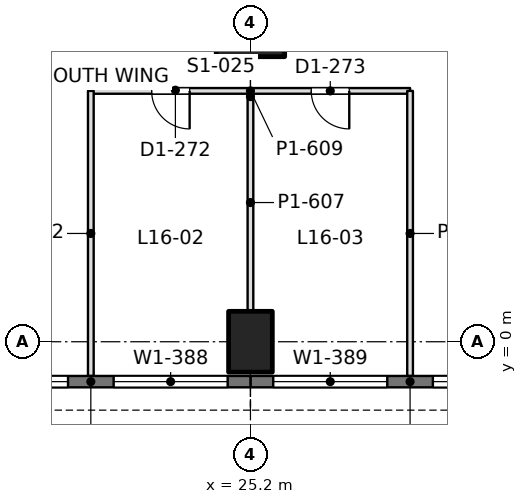
"""IFC4 building model, lengths in metres.
Left out: names, types, materials, properties, quantities, classifications, styles, units other than length and angle.
Written with IfcOpenShell. Run it as: python <this file> out.ifc"""

import sys

from ifc_helpers import new_model, si_unit, direction, frame, frame_2d, origin, origin_2d, place, context, subcontext, project, spatial, rectangle, extrude, element, fill, save


model = new_model("IFC4")
c1 = context("Model", 3, precision=1e-05, world=origin(), true_north=direction((0.0, 1.0)))
c2 = subcontext(c1, "Body", "Model", "MODEL_VIEW")
j1 = project(units=[si_unit("LENGTHUNIT", "METRE"), si_unit("PLANEANGLEUNIT", "RADIAN")], contexts=[c1])
p1 = place(None, origin())
s1 = spatial("IfcSite", under=j1, at=p1, CompositionType="ELEMENT")
p2 = place(p1, origin())
s2 = spatial("IfcBuilding", under=s1, at=p2, CompositionType="ELEMENT")
p3 = place(p2, frame((0.0, 0.0, 72.9)))
s3 = spatial("IfcBuildingStorey", under=s2, at=p3, CompositionType="ELEMENT", Elevation=72.9)
p4 = place(p3, frame((25.2, 0.0, 0.0), z_axis=(0.0, 0.0, 1.0), x_axis=(1.0, 0.0, 0.0)))
e1 = element("IfcColumn", 1, at=p4, inside=s3, PredefinedType="COLUMN", context=c2, shape_type="SweptSolid", body=[
    extrude(rectangle(XDim=1.15, YDim=1.6, at=origin_2d()), origin(), (0.0, 0.0, 1.0), 4.5),
])
p5 = place(p3, frame((25.2, 8.4, 0.0), z_axis=(0.0, 0.0, 1.0), x_axis=(1.0, 0.0, 0.0)))
e2 = element("IfcColumn", 2, at=p5, inside=s3, PredefinedType="COLUMN", context=c2, shape_type="SweptSolid", body=[
    extrude(rectangle(XDim=1.8, YDim=1.8, at=origin_2d()), origin(), (0.0, 0.0, 1.0), 4.5),
])
p6 = place(p3, frame((33.6, -1.05, 0.0), z_axis=(0.0, 0.0, 1.0), x_axis=(-1.0, 0.0, 0.0)))
e3 = element("IfcWall", 3, at=p6, inside=s3, PredefinedType="SOLIDWALL", context=c2, shape_type="SweptSolid", body=[
    extrude(rectangle(XDim=8.4, YDim=0.3, at=frame_2d((4.2, 0.0))), origin(), (0.0, 0.0, 1.0), 4.34),
])
p7 = place(p6, frame((0.6, 0.0, 0.9)))
e4 = element("IfcOpeningElement", 4, at=p7, cuts=e3, PredefinedType="OPENING", context=c2, shape_type="SweptSolid", body=[
    extrude(rectangle(XDim=3.0, YDim=1.9, at=frame_2d((1.5, 0.95))), frame((0.0, 0.16, 0.0), z_axis=(0.0, -1.0, 0.0), x_axis=(1.0, 0.0, 0.0)), (0.0, 0.0, 1.0), 0.32),
])
p8 = place(p6, frame((4.8, 0.0, 0.9)))
e5 = element("IfcOpeningElement", 5, at=p8, cuts=e3, PredefinedType="OPENING", context=c2, shape_type="SweptSolid", body=[
    extrude(rectangle(XDim=3.0, YDim=1.9, at=frame_2d((1.5, 0.95))), frame((0.0, 0.16, 0.0), z_axis=(0.0, -1.0, 0.0), x_axis=(1.0, 0.0, 0.0)), (0.0, 0.0, 1.0), 0.32),
])
p9 = place(p3, frame((25.2, -1.05, 0.0), z_axis=(0.0, 0.0, 1.0), x_axis=(-1.0, 0.0, 0.0)))
e6 = element("IfcWall", 6, at=p9, inside=s3, PredefinedType="SOLIDWALL", context=c2, shape_type="SweptSolid", body=[
    extrude(rectangle(XDim=8.4, YDim=0.3, at=frame_2d((4.2, 0.0))), origin(), (0.0, 0.0, 1.0), 4.34),
])
p10 = place(p9, frame((0.6, 0.0, 0.9)))
e7 = element("IfcOpeningElement", 7, at=p10, cuts=e6, PredefinedType="OPENING", context=c2, shape_type="SweptSolid", body=[
    extrude(rectangle(XDim=3.0, YDim=1.9, at=frame_2d((1.5, 0.95))), frame((0.0, 0.16, 0.0), z_axis=(0.0, -1.0, 0.0), x_axis=(1.0, 0.0, 0.0)), (0.0, 0.0, 1.0), 0.32),
])
p11 = place(p9, frame((4.8, 0.0, 0.9)))
e8 = element("IfcOpeningElement", 8, at=p11, cuts=e6, PredefinedType="OPENING", context=c2, shape_type="SweptSolid", body=[
    extrude(rectangle(XDim=3.0, YDim=1.9, at=frame_2d((1.5, 0.95))), frame((0.0, 0.16, 0.0), z_axis=(0.0, -1.0, 0.0), x_axis=(1.0, 0.0, 0.0)), (0.0, 0.0, 1.0), 0.32),
])
p12 = place(p3, frame((21.0, 6.6, 0.0), z_axis=(0.0, 0.0, 1.0), x_axis=(1.0, 0.0, 0.0)))
e9 = element("IfcWall", 9, at=p12, inside=s3, PredefinedType="PARTITIONING", context=c2, shape_type="SweptSolid", body=[
    extrude(rectangle(XDim=8.4, YDim=0.15, at=frame_2d((4.2, 0.0))), origin(), (0.0, 0.0, 1.0), 3.74),
])
p13 = place(p12, frame((1.6, 0.0, 0.0)))
e10 = element("IfcOpeningElement", 10, at=p13, cuts=e9, PredefinedType="OPENING", context=c2, shape_type="SweptSolid", body=[
    extrude(rectangle(XDim=1.0, YDim=2.2, at=frame_2d((0.5, 1.1))), frame((0.0, 0.085, 0.0), z_axis=(0.0, -1.0, 0.0), x_axis=(1.0, 0.0, 0.0)), (0.0, 0.0, 1.0), 0.17),
])
p14 = place(p12, frame((5.8, 0.0, 0.0)))
e11 = element("IfcOpeningElement", 11, at=p14, cuts=e9, PredefinedType="OPENING", context=c2, shape_type="SweptSolid", body=[
    extrude(rectangle(XDim=1.0, YDim=2.2, at=frame_2d((0.5, 1.1))), frame((0.0, 0.085, 0.0), z_axis=(0.0, -1.0, 0.0), x_axis=(1.0, 0.0, 0.0)), (0.0, 0.0, 1.0), 0.17),
])
p15 = place(p3, frame((21.0, -0.902, 0.0), z_axis=(0.0, 0.0, 1.0), x_axis=(0.0, 1.0, 0.0)))
e12 = element("IfcWall", 12, at=p15, inside=s3, PredefinedType="PARTITIONING", context=c2, shape_type="SweptSolid", body=[
    extrude(rectangle(XDim=7.502, YDim=0.15, at=frame_2d((3.751, 0.0))), origin(), (0.0, 0.0, 1.0), 3.84),
])
p16 = place(p3, frame((25.2, 0.799, 0.0), z_axis=(0.0, 0.0, 1.0), x_axis=(0.0, 1.0, 0.0)))
e13 = element("IfcWall", 13, at=p16, inside=s3, PredefinedType="PARTITIONING", context=c2, shape_type="SweptSolid", body=[
    extrude(rectangle(XDim=5.727, YDim=0.15, at=frame_2d((2.863, 0.0))), origin(), (0.0, 0.0, 1.0), 3.74),
])
p17 = place(p3, frame((29.4, -0.902, 0.0), z_axis=(0.0, 0.0, 1.0), x_axis=(0.0, 1.0, 0.0)))
e14 = element("IfcWall", 14, at=p17, inside=s3, PredefinedType="PARTITIONING", context=c2, shape_type="SweptSolid", body=[
    extrude(rectangle(XDim=7.502, YDim=0.15, at=frame_2d((3.751, 0.0))), origin(), (0.0, 0.0, 1.0), 3.84),
])
p18 = place(p7, origin())
e15 = element("IfcWindow", 15, at=p18, inside=s3, PartitioningType="SINGLE_PANEL", PredefinedType="WINDOW", context=c2, shape_type="SweptSolid", body=[
    extrude(rectangle(XDim=3.0, YDim=1.9, at=frame_2d((1.5, 0.95))), frame((0.0, 0.03, 0.0), z_axis=(0.0, -1.0, 0.0), x_axis=(1.0, 0.0, 0.0)), (0.0, 0.0, 1.0), 0.06),
])
fill(e4, e15)
p19 = place(p8, origin())
e16 = element("IfcWindow", 16, at=p19, inside=s3, PartitioningType="SINGLE_PANEL", PredefinedType="WINDOW", context=c2, shape_type="SweptSolid", body=[
    extrude(rectangle(XDim=3.0, YDim=1.9, at=frame_2d((1.5, 0.95))), frame((0.0, 0.03, 0.0), z_axis=(0.0, -1.0, 0.0), x_axis=(1.0, 0.0, 0.0)), (0.0, 0.0, 1.0), 0.06),
])
fill(e5, e16)
p20 = place(p10, origin())
e17 = element("IfcWindow", 17, at=p20, inside=s3, PartitioningType="SINGLE_PANEL", PredefinedType="WINDOW", context=c2, shape_type="SweptSolid", body=[
    extrude(rectangle(XDim=3.0, YDim=1.9, at=frame_2d((1.5, 0.95))), frame((0.0, 0.03, 0.0), z_axis=(0.0, -1.0, 0.0), x_axis=(1.0, 0.0, 0.0)), (0.0, 0.0, 1.0), 0.06),
])
fill(e7, e17)
p21 = place(p11, origin())
e18 = element("IfcWindow", 18, at=p21, inside=s3, PartitioningType="SINGLE_PANEL", PredefinedType="WINDOW", context=c2, shape_type="SweptSolid", body=[
    extrude(rectangle(XDim=3.0, YDim=1.9, at=frame_2d((1.5, 0.95))), frame((0.0, 0.03, 0.0), z_axis=(0.0, -1.0, 0.0), x_axis=(1.0, 0.0, 0.0)), (0.0, 0.0, 1.0), 0.06),
])
fill(e8, e18)
p22 = place(p13, frame((1.0, 0.0, 0.0), z_axis=(0.0, 0.0, 1.0), x_axis=(-1.0, 0.0, 0.0)))
e19 = element("IfcDoor", 19, at=p22, inside=s3, OperationType="SINGLE_SWING_LEFT", PredefinedType="DOOR", context=c2, shape_type="SweptSolid", body=[
    extrude(rectangle(XDim=1.0, YDim=2.2, at=frame_2d((0.5, 1.1))), frame((0.0, 0.025, 0.0), z_axis=(0.0, -1.0, 0.0), x_axis=(1.0, 0.0, 0.0)), (0.0, 0.0, 1.0), 0.05),
])
fill(e10, e19)
p23 = place(p14, frame((1.0, 0.0, 0.0), z_axis=(0.0, 0.0, 1.0), x_axis=(-1.0, 0.0, 0.0)))
e20 = element("IfcDoor", 20, at=p23, inside=s3, OperationType="SINGLE_SWING_LEFT", PredefinedType="DOOR", context=c2, shape_type="SweptSolid", body=[
    extrude(rectangle(XDim=1.0, YDim=2.2, at=frame_2d((0.5, 1.1))), frame((0.0, 0.025, 0.0), z_axis=(0.0, -1.0, 0.0), x_axis=(1.0, 0.0, 0.0)), (0.0, 0.0, 1.0), 0.05),
])
fill(e11, e20)
save(model, sys.argv[1])
